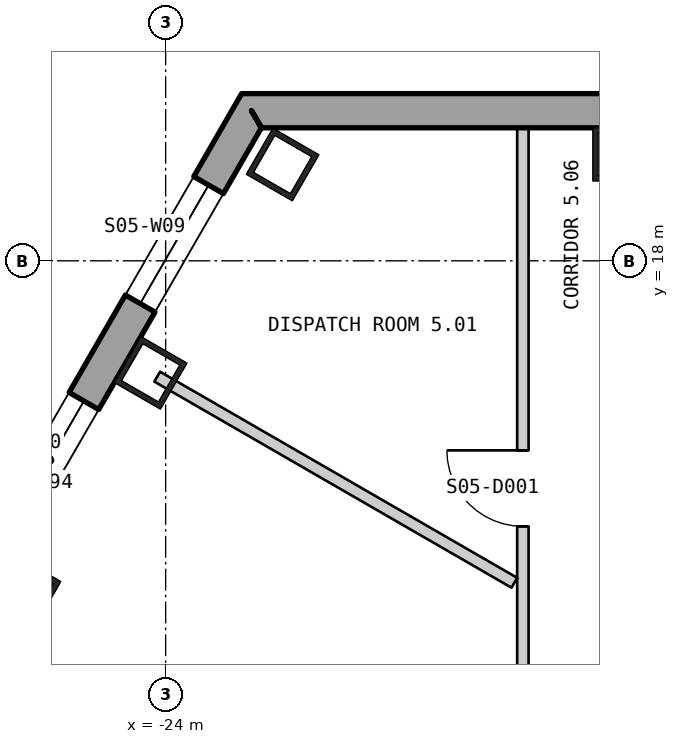
"""IFC4 building model, lengths in metres.
Left out: names, types, materials, properties, quantities, classifications, styles, units other than length and angle.
Written with IfcOpenShell. Run it as: python <this file> out.ifc"""

import sys

from ifc_helpers import new_model, si_unit, direction, frame, frame_2d, origin, origin_2d, place, context, subcontext, project, spatial, polyline, rectangle, hollow_rectangle, outline, extrude, element, fill, save


model = new_model("IFC4")
c1 = context("Model", 3, precision=1e-05, world=origin(), true_north=direction((0.0, 1.0)))
c2 = subcontext(c1, "Body", "Model", "MODEL_VIEW")
j1 = project(units=[si_unit("LENGTHUNIT", "METRE"), si_unit("PLANEANGLEUNIT", "RADIAN")], contexts=[c1])
p1 = place(None, origin())
s1 = spatial("IfcSite", under=j1, at=p1, CompositionType="ELEMENT")
p2 = place(p1, origin())
s2 = spatial("IfcBuilding", under=s1, at=p2, CompositionType="ELEMENT")
p3 = place(p2, frame((0.0, 0.0, 69.3)))
s3 = spatial("IfcBuildingStorey", under=s2, at=p3, CompositionType="ELEMENT", Elevation=69.3)
for number, where, z_axis, x_axis in (
    (1, (-18.03, 19.4, 0.0), (0.0, 0.0, 1.0), (-1.0, 0.0, 0.0)),
    (2, (-22.461, 19.267, 0.0), (0.0, 0.0, 1.0), (-0.5, -0.866, 0.0)),
    (3, (-24.197, 16.526, 0.0), (0.0, 0.0, 1.0), (-0.5, -0.866, 0.0)),
    (4, (-25.857, 13.652, 0.0), (0.0, 0.0, 1.0), (-0.5, -0.866, 0.0)),
):
    element("IfcColumn", number, at=place(p3, frame(where, z_axis=z_axis, x_axis=x_axis)), inside=s3, PredefinedType="COLUMN", context=c2, shape_type="SweptSolid", body=[
        extrude(hollow_rectangle(XDim=0.7, YDim=0.7, WallThickness=0.07, at=origin_2d()), origin(), (0.0, 0.0, 1.0), 4.5),
    ])
p4 = place(p3, frame((22.87, 19.975, -0.4), z_axis=(0.0, 0.0, 1.0), x_axis=(-1.0, 0.0, 0.0)))
e5 = element("IfcWall", 5, at=p4, inside=s3, PredefinedType="SOLIDWALL", context=c2, shape_type="SweptSolid", body=[
    extrude(outline(polyline([(-0.13, -0.225), (45.87, -0.225), (45.61, 0.225), (0.13, 0.225), (-0.13, -0.225)])), origin(), (0.0, 0.0, 1.0), 4.5),
])
p5 = place(p4, frame((5.893, 0.0, 1.3)))
e6 = element("IfcOpeningElement", 6, at=p5, cuts=e5, PredefinedType="OPENING", context=c2, shape_type="SweptSolid", body=[
    extrude(rectangle(XDim=2.4, YDim=2.6, at=frame_2d((1.2, 1.3))), frame((0.0, 0.235, 0.0), z_axis=(0.0, -1.0, 0.0), x_axis=(1.0, 0.0, 0.0)), (0.0, 0.0, 1.0), 0.47),
])
p6 = place(p4, frame((10.401, 0.0, 1.3)))
e7 = element("IfcOpeningElement", 7, at=p6, cuts=e5, PredefinedType="OPENING", context=c2, shape_type="SweptSolid", body=[
    extrude(rectangle(XDim=2.4, YDim=2.6, at=frame_2d((1.2, 1.3))), frame((0.0, 0.235, 0.0), z_axis=(0.0, -1.0, 0.0), x_axis=(1.0, 0.0, 0.0)), (0.0, 0.0, 1.0), 0.47),
])
p7 = place(p4, frame((14.909, 0.0, 1.3)))
e8 = element("IfcOpeningElement", 8, at=p7, cuts=e5, PredefinedType="OPENING", context=c2, shape_type="SweptSolid", body=[
    extrude(rectangle(XDim=2.4, YDim=2.6, at=frame_2d((1.2, 1.3))), frame((0.0, 0.235, 0.0), z_axis=(0.0, -1.0, 0.0), x_axis=(1.0, 0.0, 0.0)), (0.0, 0.0, 1.0), 0.47),
])
p8 = place(p4, frame((19.416, 0.0, 1.3)))
e9 = element("IfcOpeningElement", 9, at=p8, cuts=e5, PredefinedType="OPENING", context=c2, shape_type="SweptSolid", body=[
    extrude(rectangle(XDim=2.4, YDim=2.6, at=frame_2d((1.2, 1.3))), frame((0.0, 0.235, 0.0), z_axis=(0.0, -1.0, 0.0), x_axis=(1.0, 0.0, 0.0)), (0.0, 0.0, 1.0), 0.47),
])
p9 = place(p4, frame((23.924, 0.0, 1.3)))
e10 = element("IfcOpeningElement", 10, at=p9, cuts=e5, PredefinedType="OPENING", context=c2, shape_type="SweptSolid", body=[
    extrude(rectangle(XDim=2.4, YDim=2.6, at=frame_2d((1.2, 1.3))), frame((0.0, 0.235, 0.0), z_axis=(0.0, -1.0, 0.0), x_axis=(1.0, 0.0, 0.0)), (0.0, 0.0, 1.0), 0.47),
])
p10 = place(p4, frame((28.431, 0.0, 1.3)))
e11 = element("IfcOpeningElement", 11, at=p10, cuts=e5, PredefinedType="OPENING", context=c2, shape_type="SweptSolid", body=[
    extrude(rectangle(XDim=2.4, YDim=2.6, at=frame_2d((1.2, 1.3))), frame((0.0, 0.235, 0.0), z_axis=(0.0, -1.0, 0.0), x_axis=(1.0, 0.0, 0.0)), (0.0, 0.0, 1.0), 0.47),
])
p11 = place(p4, frame((32.939, 0.0, 1.3)))
e12 = element("IfcOpeningElement", 12, at=p11, cuts=e5, PredefinedType="OPENING", context=c2, shape_type="SweptSolid", body=[
    extrude(rectangle(XDim=2.4, YDim=2.6, at=frame_2d((1.2, 1.3))), frame((0.0, 0.235, 0.0), z_axis=(0.0, -1.0, 0.0), x_axis=(1.0, 0.0, 0.0)), (0.0, 0.0, 1.0), 0.47),
])
p12 = place(p4, frame((37.447, 0.0, 1.3)))
e13 = element("IfcOpeningElement", 13, at=p12, cuts=e5, PredefinedType="OPENING", context=c2, shape_type="SweptSolid", body=[
    extrude(rectangle(XDim=2.4, YDim=2.6, at=frame_2d((1.2, 1.3))), frame((0.0, 0.235, 0.0), z_axis=(0.0, -1.0, 0.0), x_axis=(1.0, 0.0, 0.0)), (0.0, 0.0, 1.0), 0.47),
])
p13 = place(p3, frame((-22.87, 19.975, -0.4), z_axis=(0.0, 0.0, 1.0), x_axis=(-0.499998491145, -0.866026274921, 0.0)))
e14 = element("IfcWall", 14, at=p13, inside=s3, PredefinedType="SOLIDWALL", context=c2, shape_type="SweptSolid", body=[
    extrude(outline(polyline([(-0.13, -0.225), (10.75, -0.225), (10.49, 0.225), (0.13, 0.225), (-0.13, -0.225)])), origin(), (0.0, 0.0, 1.0), 4.5),
])
p14 = place(p13, frame((1.13, 0.0, 1.3)))
e15 = element("IfcOpeningElement", 15, at=p14, cuts=e14, PredefinedType="OPENING", context=c2, shape_type="SweptSolid", body=[
    extrude(rectangle(XDim=1.8, YDim=2.6, at=frame_2d((0.9, 1.3))), frame((0.0, 0.235, 0.0), z_axis=(0.0, -1.0, 0.0), x_axis=(1.0, 0.0, 0.0)), (0.0, 0.0, 1.0), 0.47),
])
p15 = place(p13, frame((4.41, 0.0, 1.3)))
e16 = element("IfcOpeningElement", 16, at=p15, cuts=e14, PredefinedType="OPENING", context=c2, shape_type="SweptSolid", body=[
    extrude(rectangle(XDim=1.8, YDim=2.6, at=frame_2d((0.9, 1.3))), frame((0.0, 0.235, 0.0), z_axis=(0.0, -1.0, 0.0), x_axis=(1.0, 0.0, 0.0)), (0.0, 0.0, 1.0), 0.47),
])
p16 = place(p13, frame((7.69, 0.0, 1.3)))
e17 = element("IfcOpeningElement", 17, at=p16, cuts=e14, PredefinedType="OPENING", context=c2, shape_type="SweptSolid", body=[
    extrude(rectangle(XDim=1.8, YDim=2.6, at=frame_2d((0.9, 1.3))), frame((0.0, 0.235, 0.0), z_axis=(0.0, -1.0, 0.0), x_axis=(1.0, 0.0, 0.0)), (0.0, 0.0, 1.0), 0.47),
])
p17 = place(p3, frame((-24.111, 16.476, 0.0), z_axis=(0.0, 0.0, 1.0), x_axis=(0.866102723824, -0.499866053843, 0.0)))
e18 = element("IfcWall", 18, at=p17, inside=s3, PredefinedType="PARTITIONING", context=c2, shape_type="SweptSolid", body=[
    extrude(rectangle(XDim=5.426, YDim=0.15, at=frame_2d((2.713, 0.0))), origin(), (0.0, 0.0, 1.0), 4.3),
])
p18 = place(p3, frame((-19.3, -1.875, 0.0), z_axis=(0.0, 0.0, 1.0), x_axis=(0.0, 1.0, 0.0)))
e19 = element("IfcWall", 19, at=p18, inside=s3, PredefinedType="PARTITIONING", context=c2, shape_type="SweptSolid", body=[
    extrude(rectangle(XDim=21.624, YDim=0.15, at=frame_2d((10.812, 0.0))), origin(), (0.0, 0.0, 1.0), 4.3),
])
p19 = place(p18, frame((16.381, 0.0, 0.0)))
e20 = element("IfcOpeningElement", 20, at=p19, cuts=e19, PredefinedType="OPENING", context=c2, shape_type="SweptSolid", body=[
    extrude(rectangle(XDim=1.0, YDim=2.1, at=frame_2d((0.5, 1.05))), frame((0.0, 0.085, 0.0), z_axis=(0.0, -1.0, 0.0), x_axis=(1.0, 0.0, 0.0)), (0.0, 0.0, 1.0), 0.17),
])
p20 = place(p14, origin())
e21 = element("IfcWindow", 21, at=p20, inside=s3, PartitioningType="SINGLE_PANEL", PredefinedType="WINDOW", context=c2, shape_type="SweptSolid", body=[
    extrude(rectangle(XDim=1.8, YDim=2.6, at=frame_2d((0.9, 1.3))), frame((0.0, 0.105, 0.0), z_axis=(0.0, -1.0, 0.0), x_axis=(1.0, 0.0, 0.0)), (0.0, 0.0, 1.0), 0.06),
])
fill(e15, e21)
p21 = place(p15, origin())
e22 = element("IfcWindow", 22, at=p21, inside=s3, PartitioningType="SINGLE_PANEL", PredefinedType="WINDOW", context=c2, shape_type="SweptSolid", body=[
    extrude(rectangle(XDim=1.8, YDim=2.6, at=frame_2d((0.9, 1.3))), frame((0.0, 0.105, 0.0), z_axis=(0.0, -1.0, 0.0), x_axis=(1.0, 0.0, 0.0)), (0.0, 0.0, 1.0), 0.06),
])
fill(e16, e22)
p22 = place(p19, origin())
e23 = element("IfcDoor", 23, at=p22, inside=s3, OperationType="SINGLE_SWING_LEFT", PredefinedType="DOOR", context=c2, shape_type="SweptSolid", body=[
    extrude(rectangle(XDim=1.0, YDim=2.1, at=frame_2d((0.5, 1.05))), frame((0.0, 0.025, 0.0), z_axis=(0.0, -1.0, 0.0), x_axis=(1.0, 0.0, 0.0)), (0.0, 0.0, 1.0), 0.05),
])
fill(e20, e23)
save(model, sys.argv[1])
